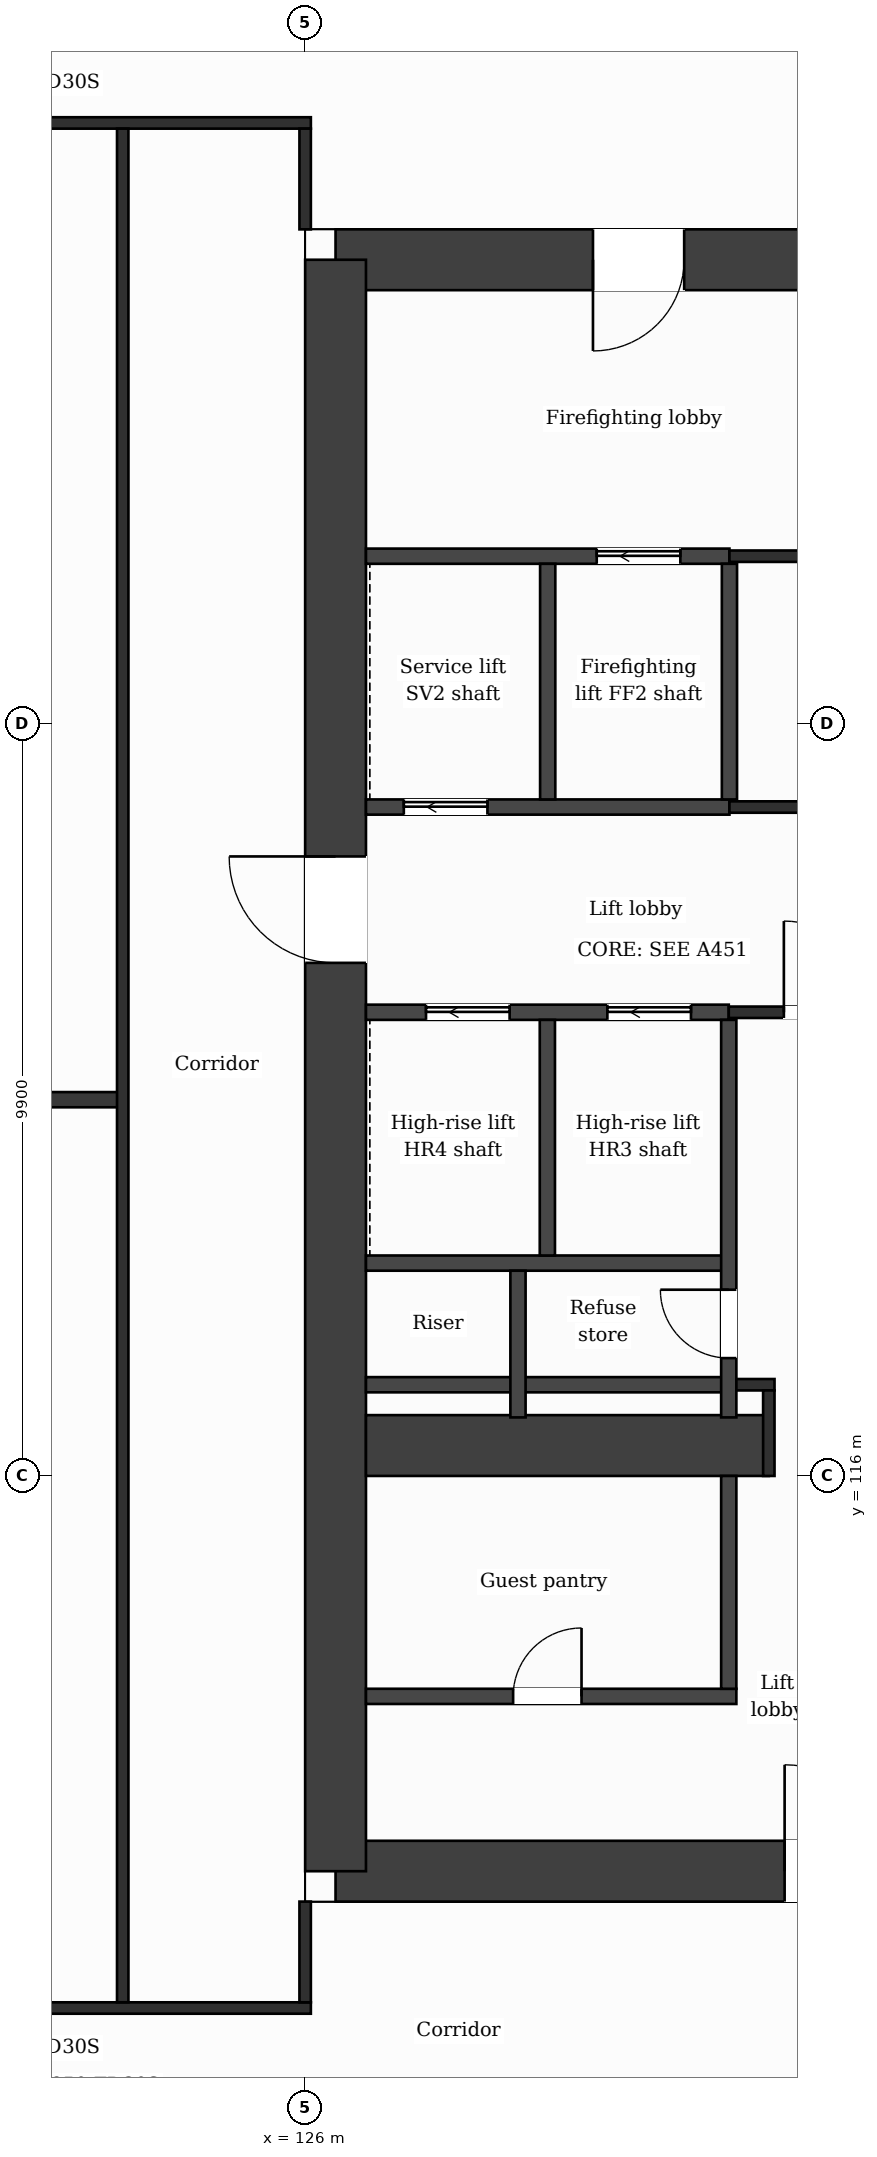
"""IFC4 building model, lengths in metres.
Left out: names, types, materials, properties, quantities, classifications, styles, units other than length and angle.
Written with IfcOpenShell. Run it as: python <this file> out.ifc"""

import sys

from ifc_helpers import new_model, si_unit, direction, frame, frame_2d, origin, place, context, subcontext, project, spatial, rectangle, extrude, element, fill, save


model = new_model("IFC4")
c1 = context("Model", 3, precision=1e-05, world=origin(), true_north=direction((0.0, 1.0)))
c2 = subcontext(c1, "Body", "Model", "MODEL_VIEW")
j1 = project(units=[si_unit("LENGTHUNIT", "METRE"), si_unit("PLANEANGLEUNIT", "RADIAN")], contexts=[c1])
p1 = place(None, origin())
s1 = spatial("IfcSite", under=j1, at=p1, CompositionType="ELEMENT")
p2 = place(p1, origin())
s2 = spatial("IfcBuilding", under=s1, at=p2, CompositionType="ELEMENT")
p3 = place(p2, frame((0.0, 0.0, 209.6)))
s3 = spatial("IfcBuildingStorey", under=s2, at=p3, CompositionType="ELEMENT", Elevation=209.6)
p4 = place(p3, frame((126.4, 132.0, 0.0), z_axis=(0.0, 0.0, 1.0), x_axis=(1.0, 0.0, 0.0)))
e1 = element("IfcWall", 1, at=p4, inside=s3, PredefinedType="SHEAR", context=c2, shape_type="SweptSolid", body=[
    extrude(rectangle(XDim=11.42, YDim=0.8, at=frame_2d((5.71, 0.0))), origin(), (0.0, 0.0, 1.0), 3.7),
])
p5 = place(p4, frame((3.386, 0.0, 0.0)))
e2 = element("IfcOpeningElement", 2, at=p5, cuts=e1, PredefinedType="OPENING", context=c2, shape_type="SweptSolid", body=[
    extrude(rectangle(XDim=1.2, YDim=2.1, at=frame_2d((0.6, 1.05))), frame((0.0, 0.41, 0.0), z_axis=(0.0, -1.0, 0.0), x_axis=(1.0, 0.0, 0.0)), (0.0, 0.0, 1.0), 0.82),
])
p6 = place(p3, frame((140.673, 110.8, 0.0), z_axis=(0.0, 0.0, 1.0), x_axis=(-1.0, 0.0, 0.0)))
e3 = element("IfcWall", 3, at=p6, inside=s3, PredefinedType="SHEAR", context=c2, shape_type="SweptSolid", body=[
    extrude(rectangle(XDim=14.273, YDim=0.8, at=frame_2d((7.137, 0.0))), origin(), (0.0, 0.0, 1.0), 3.7),
])
p7 = place(p6, frame((6.965, 0.0, 0.0)))
e4 = element("IfcOpeningElement", 4, at=p7, cuts=e3, PredefinedType="OPENING", context=c2, shape_type="SweptSolid", body=[
    extrude(rectangle(XDim=1.4, YDim=2.1, at=frame_2d((0.7, 1.05))), frame((0.0, 0.41, 0.0), z_axis=(0.0, -1.0, 0.0), x_axis=(1.0, 0.0, 0.0)), (0.0, 0.0, 1.0), 0.82),
])
p8 = place(p3, frame((126.4, 110.8, 0.0), z_axis=(0.0, 0.0, 1.0), x_axis=(0.0, 1.0, 0.0)))
e5 = element("IfcWall", 5, at=p8, inside=s3, PredefinedType="SHEAR", context=c2, shape_type="SweptSolid", body=[
    extrude(rectangle(XDim=21.2, YDim=0.8, at=frame_2d((10.6, 0.0))), origin(), (0.0, 0.0, 1.0), 3.7),
])
p9 = place(p8, frame((11.95, 0.0, 0.0)))
e6 = element("IfcOpeningElement", 6, at=p9, cuts=e5, PredefinedType="OPENING", context=c2, shape_type="SweptSolid", body=[
    extrude(rectangle(XDim=1.4, YDim=2.1, at=frame_2d((0.7, 1.05))), frame((0.0, 0.41, 0.0), z_axis=(0.0, -1.0, 0.0), x_axis=(1.0, 0.0, 0.0)), (0.0, 0.0, 1.0), 0.82),
])
p10 = place(p3, frame((126.8, 116.4, 0.0), z_axis=(0.0, 0.0, 1.0), x_axis=(1.0, 0.0, 0.0)))
e7 = element("IfcWall", 7, at=p10, inside=s3, PredefinedType="SHEAR", context=c2, shape_type="SweptSolid", body=[
    extrude(rectangle(XDim=5.3, YDim=0.8, at=frame_2d((2.65, 0.0))), origin(), (0.0, 0.0, 1.0), 3.7),
])
p11 = place(p3, frame((100.725, 109.0, 0.0), z_axis=(0.0, 0.0, 1.0), x_axis=(1.0, 0.0, 0.0)))
e8 = element("IfcWall", 8, at=p11, inside=s3, PredefinedType="PARTITIONING", context=c2, shape_type="SweptSolid", body=[
    extrude(rectangle(XDim=25.35, YDim=0.15, at=frame_2d((12.675, 0.0))), origin(), (0.0, 0.0, 1.0), 3.38),
])
p12 = place(p11, frame((6.15, 0.0, 0.0)))
e9 = element("IfcOpeningElement", 9, at=p12, cuts=e8, PredefinedType="OPENING", context=c2, shape_type="SweptSolid", body=[
    extrude(rectangle(XDim=1.0, YDim=2.1, at=frame_2d((0.5, 1.05))), frame((0.0, 0.085, 0.0), z_axis=(0.0, -1.0, 0.0), x_axis=(1.0, 0.0, 0.0)), (0.0, 0.0, 1.0), 0.17),
])
p13 = place(p11, frame((3.475, 0.0, 0.0)))
e10 = element("IfcOpeningElement", 10, at=p13, cuts=e8, PredefinedType="OPENING", context=c2, shape_type="SweptSolid", body=[
    extrude(rectangle(XDim=1.0, YDim=2.1, at=frame_2d((0.5, 1.05))), frame((0.0, 0.085, 0.0), z_axis=(0.0, -1.0, 0.0), x_axis=(1.0, 0.0, 0.0)), (0.0, 0.0, 1.0), 0.17),
])
p14 = place(p11, frame((12.175, 0.0, 0.0)))
e11 = element("IfcOpeningElement", 11, at=p14, cuts=e8, PredefinedType="OPENING", context=c2, shape_type="SweptSolid", body=[
    extrude(rectangle(XDim=1.0, YDim=2.1, at=frame_2d((0.5, 1.05))), frame((0.0, 0.085, 0.0), z_axis=(0.0, -1.0, 0.0), x_axis=(1.0, 0.0, 0.0)), (0.0, 0.0, 1.0), 0.17),
])
p15 = place(p11, frame((20.45, 0.0, 0.0)))
e12 = element("IfcOpeningElement", 12, at=p15, cuts=e8, PredefinedType="OPENING", context=c2, shape_type="SweptSolid", body=[
    extrude(rectangle(XDim=1.0, YDim=2.1, at=frame_2d((0.5, 1.05))), frame((0.0, 0.085, 0.0), z_axis=(0.0, -1.0, 0.0), x_axis=(1.0, 0.0, 0.0)), (0.0, 0.0, 1.0), 0.17),
])
p16 = place(p3, frame((126.8, 113.1, 0.0), z_axis=(0.0, 0.0, 1.0), x_axis=(1.0, 0.0, 0.0)))
e13 = element("IfcWall", 13, at=p16, inside=s3, PredefinedType="PARTITIONING", context=c2, shape_type="SweptSolid", body=[
    extrude(rectangle(XDim=4.873, YDim=0.2, at=frame_2d((2.437, 0.0))), origin(), (0.0, 0.0, 1.0), 3.38),
])
p17 = place(p16, frame((1.936, 0.0, 0.0)))
e14 = element("IfcOpeningElement", 14, at=p17, cuts=e13, PredefinedType="OPENING", context=c2, shape_type="SweptSolid", body=[
    extrude(rectangle(XDim=0.9, YDim=2.1, at=frame_2d((0.45, 1.05))), frame((0.0, 0.11, 0.0), z_axis=(0.0, -1.0, 0.0), x_axis=(1.0, 0.0, 0.0)), (0.0, 0.0, 1.0), 0.22),
])
p18 = place(p3, frame((126.8, 117.2, 0.0), z_axis=(0.0, 0.0, 1.0), x_axis=(1.0, 0.0, 0.0)))
e15 = element("IfcWall", 15, at=p18, inside=s3, PredefinedType="PARTITIONING", context=c2, shape_type="SweptSolid", body=[
    extrude(rectangle(XDim=4.773, YDim=0.2, at=frame_2d((2.386, 0.0))), origin(), (0.0, 0.0, 1.0), 3.38),
])
p19 = place(p3, frame((131.573, 117.2, 0.0), z_axis=(0.0, 0.0, 1.0), x_axis=(1.0, 0.0, 0.0)))
e16 = element("IfcWall", 16, at=p19, inside=s3, PredefinedType="PARTITIONING", context=c2, shape_type="SweptSolid", body=[
    extrude(rectangle(XDim=0.602, YDim=0.15, at=frame_2d((0.301, 0.0))), origin(), (0.0, 0.0, 1.0), 3.38),
])
p20 = place(p3, frame((126.8, 118.8, 0.0), z_axis=(0.0, 0.0, 1.0), x_axis=(1.0, 0.0, 0.0)))
e17 = element("IfcWall", 17, at=p20, inside=s3, PredefinedType="PARTITIONING", context=c2, shape_type="SweptSolid", body=[
    extrude(rectangle(XDim=4.773, YDim=0.2, at=frame_2d((2.386, 0.0))), origin(), (0.0, 0.0, 1.0), 3.38),
])
p21 = place(p3, frame((117.6, 120.95, 0.0), z_axis=(0.0, 0.0, 1.0), x_axis=(1.0, 0.0, 0.0)))
e18 = element("IfcWall", 18, at=p21, inside=s3, PredefinedType="PARTITIONING", context=c2, shape_type="SweptSolid", body=[
    extrude(rectangle(XDim=6.0, YDim=0.2, at=frame_2d((3.0, 0.0))), origin(), (0.0, 0.0, 1.0), 3.38),
])
p22 = place(p3, frame((126.8, 122.1, 0.0), z_axis=(0.0, 0.0, 1.0), x_axis=(1.0, 0.0, 0.0)))
e19 = element("IfcWall", 19, at=p22, inside=s3, PredefinedType="PARTITIONING", context=c2, shape_type="SweptSolid", body=[
    extrude(rectangle(XDim=4.773, YDim=0.2, at=frame_2d((2.386, 0.0))), origin(), (0.0, 0.0, 1.0), 3.38),
])
p23 = place(p22, frame((3.176, 0.0, 0.0)))
e20 = element("IfcOpeningElement", 20, at=p23, cuts=e19, PredefinedType="OPENING", context=c2, shape_type="SweptSolid", body=[
    extrude(rectangle(XDim=1.1, YDim=2.1, at=frame_2d((0.55, 1.05))), frame((0.0, 0.11, 0.0), z_axis=(0.0, -1.0, 0.0), x_axis=(1.0, 0.0, 0.0)), (0.0, 0.0, 1.0), 0.22),
])
p24 = place(p22, frame((0.79, 0.0, 0.0)))
e21 = element("IfcOpeningElement", 21, at=p24, cuts=e19, PredefinedType="OPENING", context=c2, shape_type="SweptSolid", body=[
    extrude(rectangle(XDim=1.1, YDim=2.1, at=frame_2d((0.55, 1.05))), frame((0.0, 0.11, 0.0), z_axis=(0.0, -1.0, 0.0), x_axis=(1.0, 0.0, 0.0)), (0.0, 0.0, 1.0), 0.22),
])
p25 = place(p3, frame((131.573, 122.1, 0.0), z_axis=(0.0, 0.0, 1.0), x_axis=(1.0, 0.0, 0.0)))
e22 = element("IfcWall", 22, at=p25, inside=s3, PredefinedType="PARTITIONING", context=c2, shape_type="SweptSolid", body=[
    extrude(rectangle(XDim=2.4, YDim=0.15, at=frame_2d((1.2, 0.0))), origin(), (0.0, 0.0, 1.0), 3.38),
])
p26 = place(p25, frame((0.725, 0.0, 0.0)))
e23 = element("IfcOpeningElement", 23, at=p26, cuts=e22, PredefinedType="OPENING", context=c2, shape_type="SweptSolid", body=[
    extrude(rectangle(XDim=1.2, YDim=2.1, at=frame_2d((0.6, 1.05))), frame((0.0, 0.085, 0.0), z_axis=(0.0, -1.0, 0.0), x_axis=(1.0, 0.0, 0.0)), (0.0, 0.0, 1.0), 0.17),
])
p27 = place(p3, frame((126.8, 124.8, 0.0), z_axis=(0.0, 0.0, 1.0), x_axis=(1.0, 0.0, 0.0)))
e24 = element("IfcWall", 24, at=p27, inside=s3, PredefinedType="PARTITIONING", context=c2, shape_type="SweptSolid", body=[
    extrude(rectangle(XDim=4.782, YDim=0.2, at=frame_2d((2.391, 0.0))), origin(), (0.0, 0.0, 1.0), 3.38),
])
p28 = place(p27, frame((0.498, 0.0, 0.0)))
e25 = element("IfcOpeningElement", 25, at=p28, cuts=e24, PredefinedType="OPENING", context=c2, shape_type="SweptSolid", body=[
    extrude(rectangle(XDim=1.1, YDim=2.1, at=frame_2d((0.55, 1.05))), frame((0.0, 0.11, 0.0), z_axis=(0.0, -1.0, 0.0), x_axis=(1.0, 0.0, 0.0)), (0.0, 0.0, 1.0), 0.22),
])
p29 = place(p3, frame((131.582, 124.8, 0.0), z_axis=(0.0, 0.0, 1.0), x_axis=(1.0, 0.0, 0.0)))
e26 = element("IfcWall", 26, at=p29, inside=s3, PredefinedType="PARTITIONING", context=c2, shape_type="SweptSolid", body=[
    extrude(rectangle(XDim=2.516, YDim=0.15, at=frame_2d((1.258, 0.0))), origin(), (0.0, 0.0, 1.0), 3.38),
])
p30 = place(p3, frame((126.8, 128.1, 0.0), z_axis=(0.0, 0.0, 1.0), x_axis=(1.0, 0.0, 0.0)))
e27 = element("IfcWall", 27, at=p30, inside=s3, PredefinedType="PARTITIONING", context=c2, shape_type="SweptSolid", body=[
    extrude(rectangle(XDim=4.782, YDim=0.2, at=frame_2d((2.391, 0.0))), origin(), (0.0, 0.0, 1.0), 3.38),
])
p31 = place(p30, frame((3.036, 0.0, 0.0)))
e28 = element("IfcOpeningElement", 28, at=p31, cuts=e27, PredefinedType="OPENING", context=c2, shape_type="SweptSolid", body=[
    extrude(rectangle(XDim=1.1, YDim=2.1, at=frame_2d((0.55, 1.05))), frame((0.0, 0.11, 0.0), z_axis=(0.0, -1.0, 0.0), x_axis=(1.0, 0.0, 0.0)), (0.0, 0.0, 1.0), 0.22),
])
p32 = place(p3, frame((131.582, 128.1, 0.0), z_axis=(0.0, 0.0, 1.0), x_axis=(1.0, 0.0, 0.0)))
e29 = element("IfcWall", 29, at=p32, inside=s3, PredefinedType="PARTITIONING", context=c2, shape_type="SweptSolid", body=[
    extrude(rectangle(XDim=2.391, YDim=0.15, at=frame_2d((1.195, 0.0))), origin(), (0.0, 0.0, 1.0), 3.38),
])
p33 = place(p3, frame((100.725, 133.8, 0.0), z_axis=(0.0, 0.0, 1.0), x_axis=(1.0, 0.0, 0.0)))
e30 = element("IfcWall", 30, at=p33, inside=s3, PredefinedType="PARTITIONING", context=c2, shape_type="SweptSolid", body=[
    extrude(rectangle(XDim=25.35, YDim=0.15, at=frame_2d((12.675, 0.0))), origin(), (0.0, 0.0, 1.0), 3.38),
])
p34 = place(p33, frame((4.545, 0.0, 0.0)))
e31 = element("IfcOpeningElement", 31, at=p34, cuts=e30, PredefinedType="OPENING", context=c2, shape_type="SweptSolid", body=[
    extrude(rectangle(XDim=1.0, YDim=2.1, at=frame_2d((0.5, 1.05))), frame((0.0, 0.085, 0.0), z_axis=(0.0, -1.0, 0.0), x_axis=(1.0, 0.0, 0.0)), (0.0, 0.0, 1.0), 0.17),
])
p35 = place(p33, frame((12.845, 0.0, 0.0)))
e32 = element("IfcOpeningElement", 32, at=p35, cuts=e30, PredefinedType="OPENING", context=c2, shape_type="SweptSolid", body=[
    extrude(rectangle(XDim=1.0, YDim=2.1, at=frame_2d((0.5, 1.05))), frame((0.0, 0.085, 0.0), z_axis=(0.0, -1.0, 0.0), x_axis=(1.0, 0.0, 0.0)), (0.0, 0.0, 1.0), 0.17),
])
p36 = place(p33, frame((20.45, 0.0, 0.0)))
e33 = element("IfcOpeningElement", 33, at=p36, cuts=e30, PredefinedType="OPENING", context=c2, shape_type="SweptSolid", body=[
    extrude(rectangle(XDim=1.0, YDim=2.1, at=frame_2d((0.5, 1.05))), frame((0.0, 0.085, 0.0), z_axis=(0.0, -1.0, 0.0), x_axis=(1.0, 0.0, 0.0)), (0.0, 0.0, 1.0), 0.17),
])
p37 = place(p3, frame((123.6, 109.075, 0.0), z_axis=(0.0, 0.0, 1.0), x_axis=(0.0, 1.0, 0.0)))
e34 = element("IfcWall", 34, at=p37, inside=s3, PredefinedType="PARTITIONING", context=c2, shape_type="SweptSolid", body=[
    extrude(rectangle(XDim=24.65, YDim=0.15, at=frame_2d((12.325, 0.0))), origin(), (0.0, 0.0, 1.0), 3.38),
])
p38 = place(p3, frame((126.0, 109.075, 0.0), z_axis=(0.0, 0.0, 1.0), x_axis=(0.0, 1.0, 0.0)))
e35 = element("IfcWall", 35, at=p38, inside=s3, PredefinedType="PARTITIONING", context=c2, shape_type="SweptSolid", body=[
    extrude(rectangle(XDim=1.325, YDim=0.15, at=frame_2d((0.663, 0.0))), origin(), (0.0, 0.0, 1.0), 3.38),
])
p39 = place(p3, frame((126.0, 132.4, 0.0), z_axis=(0.0, 0.0, 1.0), x_axis=(0.0, 1.0, 0.0)))
e36 = element("IfcWall", 36, at=p39, inside=s3, PredefinedType="PARTITIONING", context=c2, shape_type="SweptSolid", body=[
    extrude(rectangle(XDim=1.325, YDim=0.15, at=frame_2d((0.663, 0.0))), origin(), (0.0, 0.0, 1.0), 3.38),
])
p40 = place(p3, frame((128.8, 116.77, 0.0), z_axis=(0.0, 0.0, 1.0), x_axis=(0.0, 1.0, 0.0)))
e37 = element("IfcWall", 37, at=p40, inside=s3, PredefinedType="PARTITIONING", context=c2, shape_type="SweptSolid", body=[
    extrude(rectangle(XDim=1.93, YDim=0.2, at=frame_2d((0.965, 0.0))), origin(), (0.0, 0.0, 1.0), 3.38),
])
for number, where, z_axis, x_axis in (
    (38, (129.187, 118.9, 0.0), (0.0, 0.0, 1.0), (0.0, 1.0, 0.0)),
    (39, (129.191, 124.9, 0.0), (0.0, 0.0, 1.0), (0.0, 1.0, 0.0)),
):
    element("IfcWall", number, at=place(p3, frame(where, z_axis=z_axis, x_axis=x_axis)), inside=s3, PredefinedType="PARTITIONING", context=c2, shape_type="SweptSolid", body=[
        extrude(rectangle(XDim=3.1, YDim=0.2, at=frame_2d((1.55, 0.0))), origin(), (0.0, 0.0, 1.0), 3.38),
    ])
p41 = place(p3, frame((131.573, 113.2, 0.0), z_axis=(0.0, 0.0, 1.0), x_axis=(0.0, 1.0, 0.0)))
e40 = element("IfcWall", 40, at=p41, inside=s3, PredefinedType="PARTITIONING", context=c2, shape_type="SweptSolid", body=[
    extrude(rectangle(XDim=2.8, YDim=0.2, at=frame_2d((1.4, 0.0))), origin(), (0.0, 0.0, 1.0), 3.38),
])
p42 = place(p3, frame((131.573, 116.77, 0.0), z_axis=(0.0, 0.0, 1.0), x_axis=(0.0, 1.0, 0.0)))
e41 = element("IfcWall", 41, at=p42, inside=s3, PredefinedType="PARTITIONING", context=c2, shape_type="SweptSolid", body=[
    extrude(rectangle(XDim=5.23, YDim=0.2, at=frame_2d((2.615, 0.0))), origin(), (0.0, 0.0, 1.0), 3.38),
])
p43 = place(p42, frame((0.78, 0.0, 0.0)))
e42 = element("IfcOpeningElement", 42, at=p43, cuts=e41, PredefinedType="OPENING", context=c2, shape_type="SweptSolid", body=[
    extrude(rectangle(XDim=0.9, YDim=2.1, at=frame_2d((0.45, 1.05))), frame((0.0, 0.11, 0.0), z_axis=(0.0, -1.0, 0.0), x_axis=(1.0, 0.0, 0.0)), (0.0, 0.0, 1.0), 0.22),
])
p44 = place(p3, frame((131.582, 124.9, 0.0), z_axis=(0.0, 0.0, 1.0), x_axis=(0.0, 1.0, 0.0)))
e43 = element("IfcWall", 43, at=p44, inside=s3, PredefinedType="PARTITIONING", context=c2, shape_type="SweptSolid", body=[
    extrude(rectangle(XDim=3.1, YDim=0.2, at=frame_2d((1.55, 0.0))), origin(), (0.0, 0.0, 1.0), 3.38),
])
p45 = place(p3, frame((132.1, 116.0, 0.0), z_axis=(0.0, 0.0, 1.0), x_axis=(0.0, 1.0, 0.0)))
e44 = element("IfcWall", 44, at=p45, inside=s3, PredefinedType="PARTITIONING", context=c2, shape_type="SweptSolid", body=[
    extrude(rectangle(XDim=1.125, YDim=0.15, at=frame_2d((0.562, 0.0))), origin(), (0.0, 0.0, 1.0), 3.38),
])
p46 = place(p26, origin())
e45 = element("IfcDoor", 45, at=p46, inside=s3, OperationType="SINGLE_SWING_LEFT", PredefinedType="DOOR", context=c2, shape_type="SweptSolid", body=[
    extrude(rectangle(XDim=1.2, YDim=2.1, at=frame_2d((0.6, 1.05))), frame((0.0, 0.025, 0.0), z_axis=(0.0, -1.0, 0.0), x_axis=(1.0, 0.0, 0.0)), (0.0, 0.0, 1.0), 0.05),
])
fill(e23, e45)
p47 = place(p23, origin())
e46 = element("IfcDoor", 46, at=p47, inside=s3, OperationType="SLIDING_TO_LEFT", PredefinedType="DOOR", context=c2, shape_type="SweptSolid", body=[
    extrude(rectangle(XDim=1.1, YDim=2.1, at=frame_2d((0.55, 1.05))), frame((0.0, 0.025, 0.0), z_axis=(0.0, -1.0, 0.0), x_axis=(1.0, 0.0, 0.0)), (0.0, 0.0, 1.0), 0.05),
])
fill(e20, e46)
p48 = place(p24, origin())
e47 = element("IfcDoor", 47, at=p48, inside=s3, OperationType="SLIDING_TO_LEFT", PredefinedType="DOOR", context=c2, shape_type="SweptSolid", body=[
    extrude(rectangle(XDim=1.1, YDim=2.1, at=frame_2d((0.55, 1.05))), frame((0.0, 0.025, 0.0), z_axis=(0.0, -1.0, 0.0), x_axis=(1.0, 0.0, 0.0)), (0.0, 0.0, 1.0), 0.05),
])
fill(e21, e47)
p49 = place(p31, origin())
e48 = element("IfcDoor", 48, at=p49, inside=s3, OperationType="SLIDING_TO_LEFT", PredefinedType="DOOR", context=c2, shape_type="SweptSolid", body=[
    extrude(rectangle(XDim=1.1, YDim=2.1, at=frame_2d((0.55, 1.05))), frame((0.0, 0.025, 0.0), z_axis=(0.0, -1.0, 0.0), x_axis=(1.0, 0.0, 0.0)), (0.0, 0.0, 1.0), 0.05),
])
fill(e28, e48)
p50 = place(p28, origin())
e49 = element("IfcDoor", 49, at=p50, inside=s3, OperationType="SLIDING_TO_LEFT", PredefinedType="DOOR", context=c2, shape_type="SweptSolid", body=[
    extrude(rectangle(XDim=1.1, YDim=2.1, at=frame_2d((0.55, 1.05))), frame((0.0, 0.025, 0.0), z_axis=(0.0, -1.0, 0.0), x_axis=(1.0, 0.0, 0.0)), (0.0, 0.0, 1.0), 0.05),
])
fill(e25, e49)
p51 = place(p43, origin())
e50 = element("IfcDoor", 50, at=p51, inside=s3, OperationType="SINGLE_SWING_RIGHT", PredefinedType="DOOR", context=c2, shape_type="SweptSolid", body=[
    extrude(rectangle(XDim=0.9, YDim=2.1, at=frame_2d((0.45, 1.05))), frame((0.0, 0.025, 0.0), z_axis=(0.0, -1.0, 0.0), x_axis=(1.0, 0.0, 0.0)), (0.0, 0.0, 1.0), 0.05),
])
fill(e42, e50)
p52 = place(p17, origin())
e51 = element("IfcDoor", 51, at=p52, inside=s3, OperationType="SINGLE_SWING_RIGHT", PredefinedType="DOOR", context=c2, shape_type="SweptSolid", body=[
    extrude(rectangle(XDim=0.9, YDim=2.1, at=frame_2d((0.45, 1.05))), frame((0.0, 0.025, 0.0), z_axis=(0.0, -1.0, 0.0), x_axis=(1.0, 0.0, 0.0)), (0.0, 0.0, 1.0), 0.05),
])
fill(e14, e51)
p53 = place(p7, origin())
e52 = element("IfcDoor", 52, at=p53, inside=s3, OperationType="SINGLE_SWING_RIGHT", PredefinedType="DOOR", context=c2, shape_type="SweptSolid", body=[
    extrude(rectangle(XDim=1.4, YDim=2.1, at=frame_2d((0.7, 1.05))), frame((0.0, 0.025, 0.0), z_axis=(0.0, -1.0, 0.0), x_axis=(1.0, 0.0, 0.0)), (0.0, 0.0, 1.0), 0.05),
])
fill(e4, e52)
p54 = place(p5, origin())
e53 = element("IfcDoor", 53, at=p54, inside=s3, OperationType="SINGLE_SWING_LEFT", PredefinedType="DOOR", context=c2, shape_type="SweptSolid", body=[
    extrude(rectangle(XDim=1.2, YDim=2.1, at=frame_2d((0.6, 1.05))), frame((0.0, 0.025, 0.0), z_axis=(0.0, -1.0, 0.0), x_axis=(1.0, 0.0, 0.0)), (0.0, 0.0, 1.0), 0.05),
])
fill(e2, e53)
p55 = place(p9, origin())
e54 = element("IfcDoor", 54, at=p55, inside=s3, OperationType="SINGLE_SWING_RIGHT", PredefinedType="DOOR", context=c2, shape_type="SweptSolid", body=[
    extrude(rectangle(XDim=1.4, YDim=2.1, at=frame_2d((0.7, 1.05))), frame((0.0, 0.025, 0.0), z_axis=(0.0, -1.0, 0.0), x_axis=(1.0, 0.0, 0.0)), (0.0, 0.0, 1.0), 0.05),
])
fill(e6, e54)
save(model, sys.argv[1])
